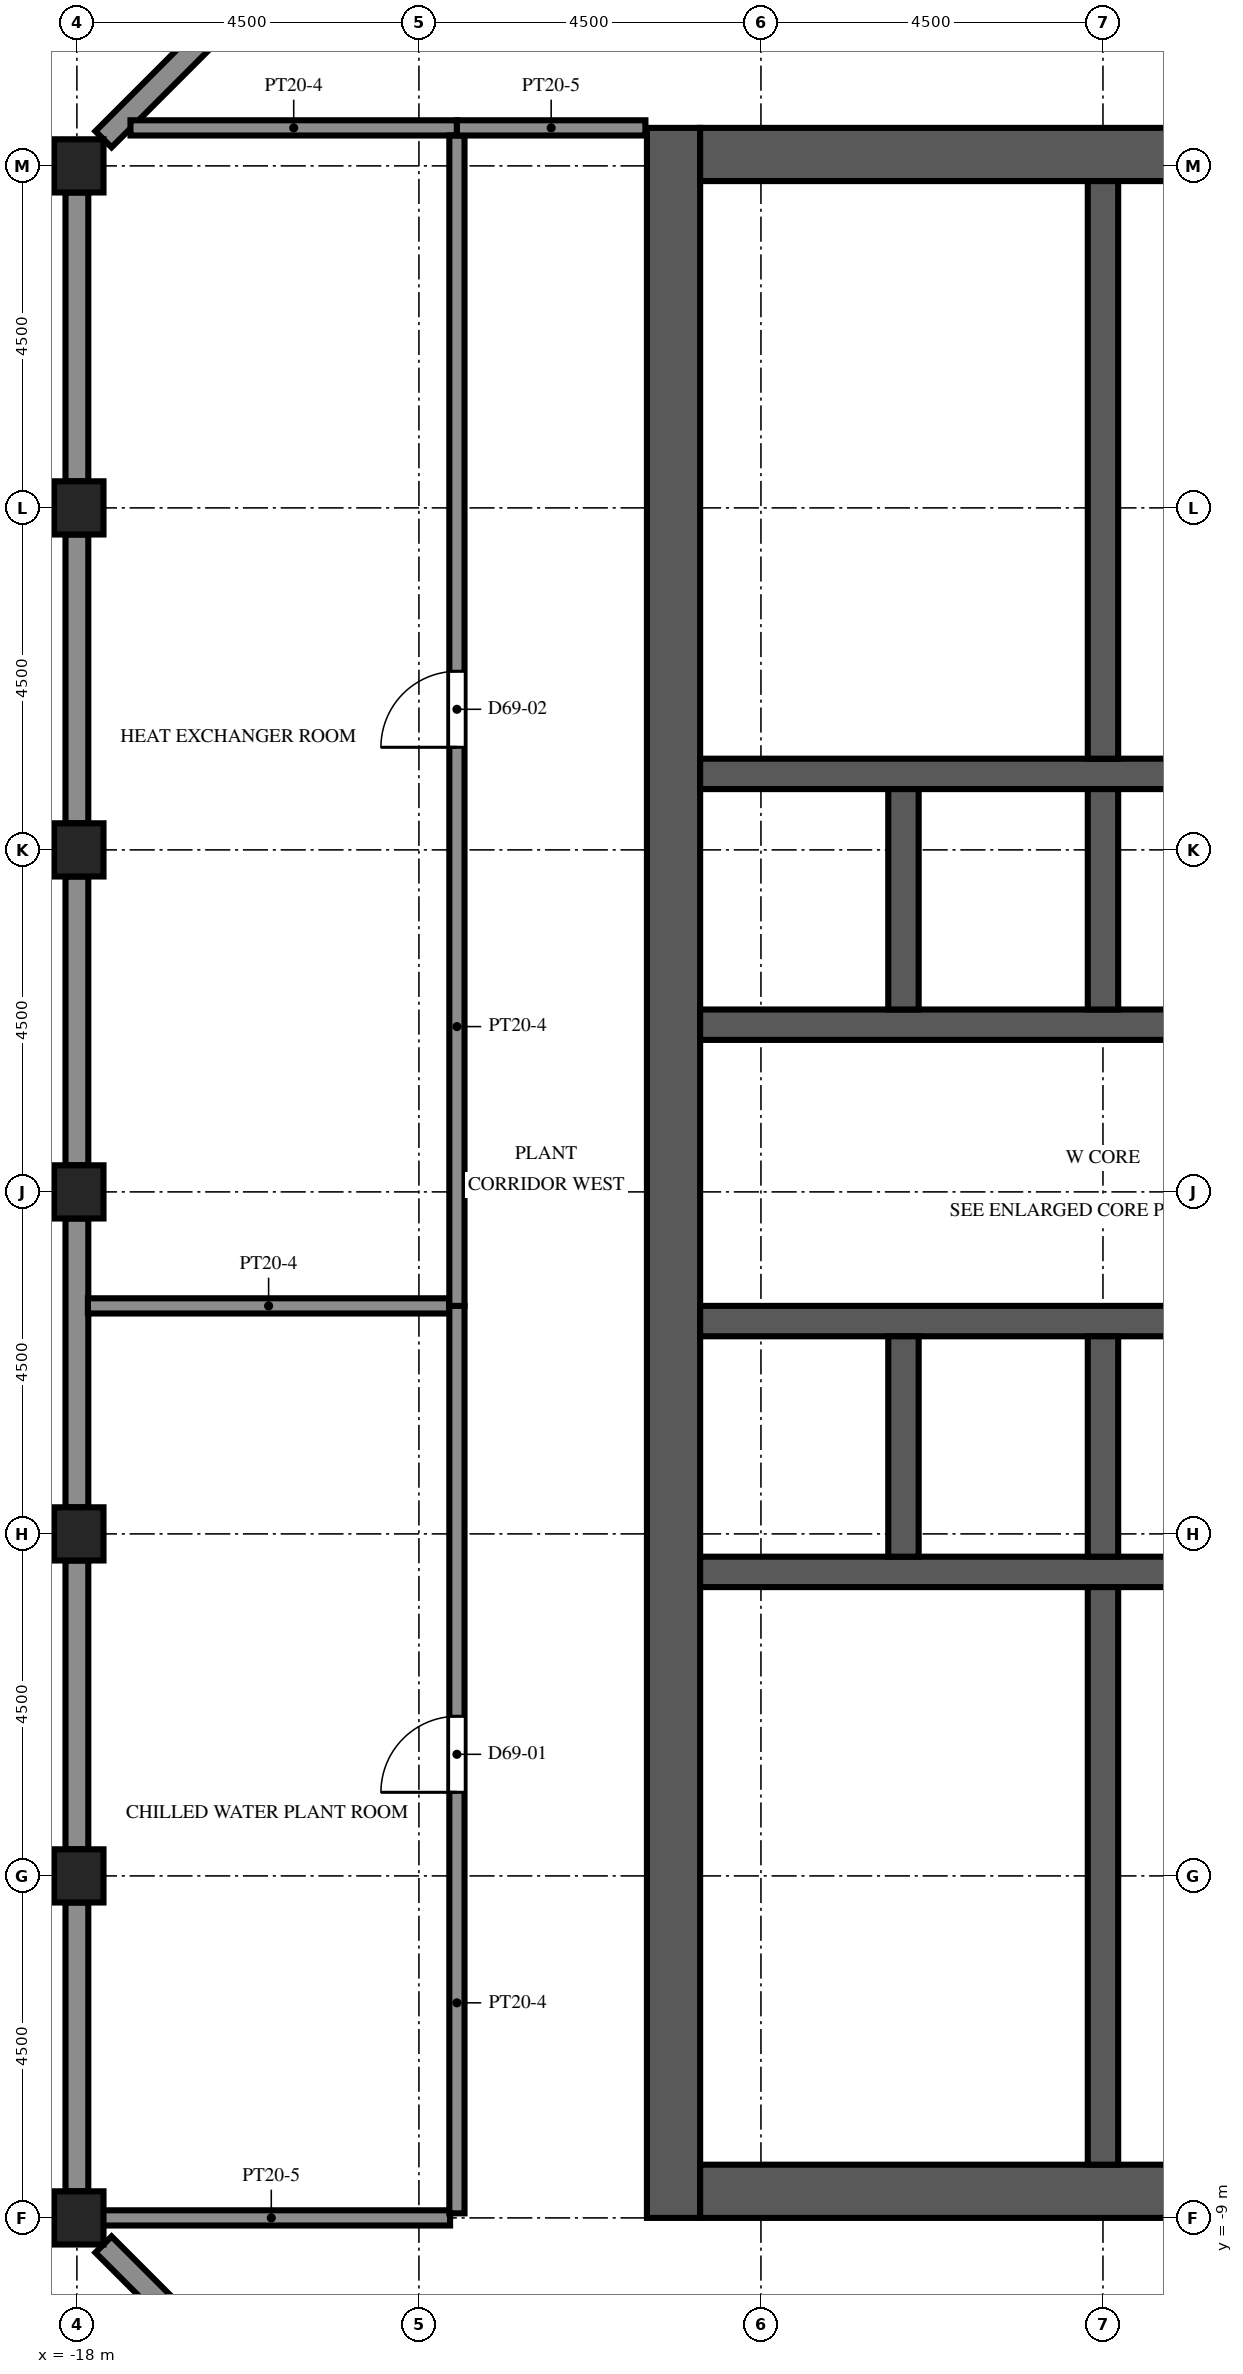
"""IFC4 building model, lengths in metres.
Left out: names, types, materials, properties, quantities, classifications, styles, units other than length and angle.
Written with IfcOpenShell. Run it as: python <this file> out.ifc"""

import sys

from ifc_helpers import new_model, si_unit, direction, frame, frame_2d, origin, origin_2d, place, context, subcontext, project, spatial, rectangle, extrude, element, fill, save


model = new_model("IFC4")
c1 = context("Model", 3, precision=1e-05, world=origin(), true_north=direction((0.0, 1.0)))
c2 = subcontext(c1, "Body", "Model", "MODEL_VIEW")
j1 = project(units=[si_unit("LENGTHUNIT", "METRE"), si_unit("PLANEANGLEUNIT", "RADIAN")], contexts=[c1])
p1 = place(None, origin())
s1 = spatial("IfcSite", under=j1, at=p1, CompositionType="ELEMENT")
p2 = place(p1, origin())
s2 = spatial("IfcBuilding", under=s1, at=p2, CompositionType="ELEMENT")
p3 = place(p2, frame((0.0, 0.0, 306.4)))
s3 = spatial("IfcBuildingStorey", under=s2, at=p3, CompositionType="ELEMENT", Elevation=306.4)
for number, where, z_axis, x_axis in (
    (1, (-18.0, -9.0, 0.0), (0.0, 0.0, 1.0), (1.0, 0.0, 0.0)),
    (2, (-18.0, -4.5, 0.0), (0.0, 0.0, 1.0), (1.0, 0.0, 0.0)),
    (3, (-18.0, 0.0, 0.0), (0.0, 0.0, 1.0), (1.0, 0.0, 0.0)),
    (4, (-18.0, 4.5, 0.0), (0.0, 0.0, 1.0), (1.0, 0.0, 0.0)),
    (5, (-18.0, 9.0, 0.0), (0.0, 0.0, 1.0), (1.0, 0.0, 0.0)),
    (6, (-18.0, 13.5, 0.0), (0.0, 0.0, 1.0), (1.0, 0.0, 0.0)),
    (7, (-18.0, 18.0, 0.0), (0.0, 0.0, 1.0), (1.0, 0.0, 0.0)),
):
    element("IfcColumn", number, at=place(p3, frame(where, z_axis=z_axis, x_axis=x_axis)), inside=s3, PredefinedType="COLUMN", context=c2, shape_type="SweptSolid", body=[
        extrude(rectangle(XDim=0.7, YDim=0.7, at=origin_2d()), origin(), (0.0, 0.0, 1.0), 5.4),
    ])
p4 = place(p3, frame((-10.15, -9.0, 0.0), z_axis=(0.0, 0.0, 1.0), x_axis=(0.0, 1.0, 0.0)))
e8 = element("IfcWall", 8, at=p4, inside=s3, PredefinedType="SHEAR", context=c2, shape_type="SweptSolid", body=[
    extrude(rectangle(XDim=27.5, YDim=0.7, at=frame_2d((13.75, 0.0))), origin(), (0.0, 0.0, 1.0), 5.4),
])
p5 = place(p4, frame((12.55, 0.0, 0.0)))
e9 = element("IfcOpeningElement", 9, at=p5, cuts=e8, PredefinedType="OPENING", context=c2, shape_type="SweptSolid", body=[
    extrude(rectangle(XDim=2.4, YDim=2.4, at=frame_2d((1.2, 1.2))), frame((0.0, 0.36, 0.0), z_axis=(0.0, -1.0, 0.0), x_axis=(1.0, 0.0, 0.0)), (0.0, 0.0, 1.0), 0.72),
])
p6 = place(p4, frame((6.825, 0.0, 0.0)))
e10 = element("IfcOpeningElement", 10, at=p6, cuts=e8, PredefinedType="OPENING", context=c2, shape_type="SweptSolid", body=[
    extrude(rectangle(XDim=1.2, YDim=2.1, at=frame_2d((0.6, 1.05))), frame((0.0, 0.36, 0.0), z_axis=(0.0, -1.0, 0.0), x_axis=(1.0, 0.0, 0.0)), (0.0, 0.0, 1.0), 0.72),
])
p7 = place(p4, frame((19.475, 0.0, 0.0)))
e11 = element("IfcOpeningElement", 11, at=p7, cuts=e8, PredefinedType="OPENING", context=c2, shape_type="SweptSolid", body=[
    extrude(rectangle(XDim=1.2, YDim=2.1, at=frame_2d((0.6, 1.05))), frame((0.0, 0.36, 0.0), z_axis=(0.0, -1.0, 0.0), x_axis=(1.0, 0.0, 0.0)), (0.0, 0.0, 1.0), 0.72),
])
for number, where, z_axis, x_axis in (
    (12, (-9.8, -8.65, 0.0), (0.0, 0.0, 1.0), (1.0, 0.0, 0.0)),
    (13, (-9.8, 18.15, 0.0), (0.0, 0.0, 1.0), (1.0, 0.0, 0.0)),
):
    element("IfcWall", number, at=place(p3, frame(where, z_axis=z_axis, x_axis=x_axis)), inside=s3, PredefinedType="SHEAR", context=c2, shape_type="SweptSolid", body=[
        extrude(rectangle(XDim=10.6, YDim=0.7, at=frame_2d((5.3, 0.0))), origin(), (0.0, 0.0, 1.0), 5.4),
    ])
p8 = place(p3, frame((-9.8, -0.5, 0.0), z_axis=(0.0, 0.0, 1.0), x_axis=(1.0, 0.0, 0.0)))
e14 = element("IfcWall", 14, at=p8, inside=s3, PredefinedType="SHEAR", context=c2, shape_type="SweptSolid", body=[
    extrude(rectangle(XDim=10.6, YDim=0.4, at=frame_2d((5.3, 0.0))), origin(), (0.0, 0.0, 1.0), 5.4),
])
p9 = place(p3, frame((-9.8, 2.8, 0.0), z_axis=(0.0, 0.0, 1.0), x_axis=(1.0, 0.0, 0.0)))
e15 = element("IfcWall", 15, at=p9, inside=s3, PredefinedType="SHEAR", context=c2, shape_type="SweptSolid", body=[
    extrude(rectangle(XDim=10.6, YDim=0.4, at=frame_2d((5.3, 0.0))), origin(), (0.0, 0.0, 1.0), 5.4),
])
p10 = place(p9, frame((0.688, 0.0, 0.0)))
e16 = element("IfcOpeningElement", 16, at=p10, cuts=e15, PredefinedType="OPENING", context=c2, shape_type="SweptSolid", body=[
    extrude(rectangle(XDim=1.1, YDim=2.1, at=frame_2d((0.55, 1.05))), frame((0.0, 0.21, 0.0), z_axis=(0.0, -1.0, 0.0), x_axis=(1.0, 0.0, 0.0)), (0.0, 0.0, 1.0), 0.42),
])
p11 = place(p9, frame((3.438, 0.0, 0.0)))
e17 = element("IfcOpeningElement", 17, at=p11, cuts=e15, PredefinedType="OPENING", context=c2, shape_type="SweptSolid", body=[
    extrude(rectangle(XDim=1.1, YDim=2.1, at=frame_2d((0.55, 1.05))), frame((0.0, 0.21, 0.0), z_axis=(0.0, -1.0, 0.0), x_axis=(1.0, 0.0, 0.0)), (0.0, 0.0, 1.0), 0.42),
])
p12 = place(p9, frame((6.113, 0.0, 0.0)))
e18 = element("IfcOpeningElement", 18, at=p12, cuts=e15, PredefinedType="OPENING", context=c2, shape_type="SweptSolid", body=[
    extrude(rectangle(XDim=1.0, YDim=2.1, at=frame_2d((0.5, 1.05))), frame((0.0, 0.21, 0.0), z_axis=(0.0, -1.0, 0.0), x_axis=(1.0, 0.0, 0.0)), (0.0, 0.0, 1.0), 0.42),
])
p13 = place(p9, frame((8.863, 0.0, 0.0)))
e19 = element("IfcOpeningElement", 19, at=p13, cuts=e15, PredefinedType="OPENING", context=c2, shape_type="SweptSolid", body=[
    extrude(rectangle(XDim=1.0, YDim=2.1, at=frame_2d((0.5, 1.05))), frame((0.0, 0.21, 0.0), z_axis=(0.0, -1.0, 0.0), x_axis=(1.0, 0.0, 0.0)), (0.0, 0.0, 1.0), 0.42),
])
p14 = place(p3, frame((-9.8, 6.7, 0.0), z_axis=(0.0, 0.0, 1.0), x_axis=(1.0, 0.0, 0.0)))
e20 = element("IfcWall", 20, at=p14, inside=s3, PredefinedType="SHEAR", context=c2, shape_type="SweptSolid", body=[
    extrude(rectangle(XDim=10.6, YDim=0.4, at=frame_2d((5.3, 0.0))), origin(), (0.0, 0.0, 1.0), 5.4),
])
p15 = place(p14, frame((0.738, 0.0, 0.0)))
e21 = element("IfcOpeningElement", 21, at=p15, cuts=e20, PredefinedType="OPENING", context=c2, shape_type="SweptSolid", body=[
    extrude(rectangle(XDim=1.0, YDim=2.1, at=frame_2d((0.5, 1.05))), frame((0.0, 0.21, 0.0), z_axis=(0.0, -1.0, 0.0), x_axis=(1.0, 0.0, 0.0)), (0.0, 0.0, 1.0), 0.42),
])
p16 = place(p14, frame((3.488, 0.0, 0.0)))
e22 = element("IfcOpeningElement", 22, at=p16, cuts=e20, PredefinedType="OPENING", context=c2, shape_type="SweptSolid", body=[
    extrude(rectangle(XDim=1.0, YDim=2.1, at=frame_2d((0.5, 1.05))), frame((0.0, 0.21, 0.0), z_axis=(0.0, -1.0, 0.0), x_axis=(1.0, 0.0, 0.0)), (0.0, 0.0, 1.0), 0.42),
])
p17 = place(p14, frame((6.113, 0.0, 0.0)))
e23 = element("IfcOpeningElement", 23, at=p17, cuts=e20, PredefinedType="OPENING", context=c2, shape_type="SweptSolid", body=[
    extrude(rectangle(XDim=1.0, YDim=2.1, at=frame_2d((0.5, 1.05))), frame((0.0, 0.21, 0.0), z_axis=(0.0, -1.0, 0.0), x_axis=(1.0, 0.0, 0.0)), (0.0, 0.0, 1.0), 0.42),
])
p18 = place(p14, frame((8.863, 0.0, 0.0)))
e24 = element("IfcOpeningElement", 24, at=p18, cuts=e20, PredefinedType="OPENING", context=c2, shape_type="SweptSolid", body=[
    extrude(rectangle(XDim=1.0, YDim=2.1, at=frame_2d((0.5, 1.05))), frame((0.0, 0.21, 0.0), z_axis=(0.0, -1.0, 0.0), x_axis=(1.0, 0.0, 0.0)), (0.0, 0.0, 1.0), 0.42),
])
p19 = place(p3, frame((-9.8, 10.0, 0.0), z_axis=(0.0, 0.0, 1.0), x_axis=(1.0, 0.0, 0.0)))
e25 = element("IfcWall", 25, at=p19, inside=s3, PredefinedType="SHEAR", context=c2, shape_type="SweptSolid", body=[
    extrude(rectangle(XDim=10.6, YDim=0.4, at=frame_2d((5.3, 0.0))), origin(), (0.0, 0.0, 1.0), 5.4),
])
for number, where, z_axis, x_axis in (
    (26, (-7.125, -0.3, 0.0), (0.0, 0.0, 1.0), (0.0, 1.0, 0.0)),
    (27, (-7.125, 6.9, 0.0), (0.0, 0.0, 1.0), (0.0, 1.0, 0.0)),
    (28, (-4.5, -0.3, 0.0), (0.0, 0.0, 1.0), (0.0, 1.0, 0.0)),
    (29, (-4.5, 6.9, 0.0), (0.0, 0.0, 1.0), (0.0, 1.0, 0.0)),
):
    element("IfcWall", number, at=place(p3, frame(where, z_axis=z_axis, x_axis=x_axis)), inside=s3, PredefinedType="SHEAR", context=c2, shape_type="SweptSolid", body=[
        extrude(rectangle(XDim=2.9, YDim=0.4, at=frame_2d((1.45, 0.0))), origin(), (0.0, 0.0, 1.0), 5.4),
    ])
for number, where, z_axis, x_axis in (
    (30, (-4.5, -8.3, 0.0), (0.0, 0.0, 1.0), (0.0, 1.0, 0.0)),
    (31, (-4.5, 10.2, 0.0), (0.0, 0.0, 1.0), (0.0, 1.0, 0.0)),
):
    element("IfcWall", number, at=place(p3, frame(where, z_axis=z_axis, x_axis=x_axis)), inside=s3, PredefinedType="SHEAR", context=c2, shape_type="SweptSolid", body=[
        extrude(rectangle(XDim=7.6, YDim=0.4, at=frame_2d((3.8, 0.0))), origin(), (0.0, 0.0, 1.0), 5.4),
    ])
p20 = place(p3, frame((-13.85, 22.15, 0.0), z_axis=(0.0, 0.0, 1.0), x_axis=(-0.707106781187, -0.707106781187, 0.0)))
e32 = element("IfcWall", 32, at=p20, inside=s3, PredefinedType="SOLIDWALL", context=c2, shape_type="SweptSolid", body=[
    extrude(rectangle(XDim=5.374, YDim=0.3, at=frame_2d((2.687, 0.0))), origin(), (0.0, 0.0, 1.0), 4.1),
])
for number, where, z_axis, x_axis in (
    (33, (-18.0, 17.65, 0.0), (0.0, 0.0, 1.0), (0.0, -1.0, 0.0)),
    (34, (-18.0, 13.15, 0.0), (0.0, 0.0, 1.0), (0.0, -1.0, 0.0)),
    (35, (-18.0, 8.65, 0.0), (0.0, 0.0, 1.0), (0.0, -1.0, 0.0)),
    (36, (-18.0, 4.15, 0.0), (0.0, 0.0, 1.0), (0.0, -1.0, 0.0)),
    (37, (-18.0, -0.35, 0.0), (0.0, 0.0, 1.0), (0.0, -1.0, 0.0)),
    (38, (-18.0, -4.85, 0.0), (0.0, 0.0, 1.0), (0.0, -1.0, 0.0)),
):
    element("IfcWall", number, at=place(p3, frame(where, z_axis=z_axis, x_axis=x_axis)), inside=s3, PredefinedType="SOLIDWALL", context=c2, shape_type="SweptSolid", body=[
        extrude(rectangle(XDim=3.8, YDim=0.3, at=frame_2d((1.9, 0.0))), origin(), (0.0, 0.0, 1.0), 0.85),
    ])
p21 = place(p3, frame((-17.65, -9.35, 0.0), z_axis=(0.0, 0.0, 1.0), x_axis=(0.707106781187, -0.707106781187, 0.0)))
e39 = element("IfcWall", 39, at=p21, inside=s3, PredefinedType="SOLIDWALL", context=c2, shape_type="SweptSolid", body=[
    extrude(rectangle(XDim=5.374, YDim=0.3, at=frame_2d((2.687, 0.0))), origin(), (0.0, 0.0, 1.0), 4.1),
])
p22 = place(p3, frame((-17.855, 3.0, 0.0), z_axis=(0.0, 0.0, 1.0), x_axis=(1.0, 0.0, 0.0)))
e40 = element("IfcWall", 40, at=p22, inside=s3, PredefinedType="PARTITIONING", context=c2, shape_type="SweptSolid", body=[
    extrude(rectangle(XDim=4.755, YDim=0.2, at=frame_2d((2.377, 0.0))), origin(), (0.0, 0.0, 1.0), 3.6),
])
p23 = place(p3, frame((-17.795, -9.0, 0.0), z_axis=(0.0, 0.0, 1.0), x_axis=(1.0, 0.0, 0.0)))
e41 = element("IfcWall", 41, at=p23, inside=s3, PredefinedType="PARTITIONING", context=c2, shape_type="SweptSolid", body=[
    extrude(rectangle(XDim=4.705, YDim=0.2, at=frame_2d((2.353, 0.0))), origin(), (0.0, 0.0, 1.0), 4.8),
])
p24 = place(p3, frame((-17.295, 18.5, 0.0), z_axis=(0.0, 0.0, 1.0), x_axis=(1.0, 0.0, 0.0)))
e42 = element("IfcWall", 42, at=p24, inside=s3, PredefinedType="PARTITIONING", context=c2, shape_type="SweptSolid", body=[
    extrude(rectangle(XDim=4.295, YDim=0.2, at=frame_2d((2.147, 0.0))), origin(), (0.0, 0.0, 1.0), 3.6),
])
p25 = place(p3, frame((-13.0, -8.94, 0.0), z_axis=(0.0, 0.0, 1.0), x_axis=(0.0, 1.0, 0.0)))
e43 = element("IfcWall", 43, at=p25, inside=s3, PredefinedType="PARTITIONING", context=c2, shape_type="SweptSolid", body=[
    extrude(rectangle(XDim=11.94, YDim=0.2, at=frame_2d((5.97, 0.0))), origin(), (0.0, 0.0, 1.0), 3.6),
])
p26 = place(p25, frame((5.54, 0.0, 0.0)))
e44 = element("IfcOpeningElement", 44, at=p26, cuts=e43, PredefinedType="OPENING", context=c2, shape_type="SweptSolid", body=[
    extrude(rectangle(XDim=1.0, YDim=2.1, at=frame_2d((0.5, 1.05))), frame((0.0, 0.11, 0.0), z_axis=(0.0, -1.0, 0.0), x_axis=(1.0, 0.0, 0.0)), (0.0, 0.0, 1.0), 0.22),
])
p27 = place(p3, frame((-13.0, 3.0, 0.0), z_axis=(0.0, 0.0, 1.0), x_axis=(0.0, 1.0, 0.0)))
e45 = element("IfcWall", 45, at=p27, inside=s3, PredefinedType="PARTITIONING", context=c2, shape_type="SweptSolid", body=[
    extrude(rectangle(XDim=15.4, YDim=0.2, at=frame_2d((7.7, 0.0))), origin(), (0.0, 0.0, 1.0), 3.6),
])
p28 = place(p27, frame((7.35, 0.0, 0.0)))
e46 = element("IfcOpeningElement", 46, at=p28, cuts=e45, PredefinedType="OPENING", context=c2, shape_type="SweptSolid", body=[
    extrude(rectangle(XDim=1.0, YDim=2.1, at=frame_2d((0.5, 1.05))), frame((0.0, 0.11, 0.0), z_axis=(0.0, -1.0, 0.0), x_axis=(1.0, 0.0, 0.0)), (0.0, 0.0, 1.0), 0.22),
])
p29 = place(p3, frame((-13.0, 18.5, 0.0), z_axis=(0.0, 0.0, 1.0), x_axis=(1.0, 0.0, 0.0)))
e47 = element("IfcWall", 47, at=p29, inside=s3, PredefinedType="PARTITIONING", context=c2, shape_type="SweptSolid", body=[
    extrude(rectangle(XDim=2.48, YDim=0.2, at=frame_2d((1.24, 0.0))), origin(), (0.0, 0.0, 1.0), 4.8),
])
p30 = place(p3, frame((-4.3, -3.74, 0.0), z_axis=(0.0, 0.0, 1.0), x_axis=(1.0, 0.0, 0.0)))
e48 = element("IfcWall", 48, at=p30, inside=s3, PredefinedType="PARTITIONING", context=c2, shape_type="SweptSolid", body=[
    extrude(rectangle(XDim=2.55, YDim=0.1, at=frame_2d((1.275, 0.0))), origin(), (0.0, 0.0, 1.0), 4.8),
])
p31 = place(p30, frame((0.775, 0.0, 0.0)))
e49 = element("IfcOpeningElement", 49, at=p31, cuts=e48, PredefinedType="OPENING", context=c2, shape_type="SweptSolid", body=[
    extrude(rectangle(XDim=1.0, YDim=2.1, at=frame_2d((0.5, 1.05))), frame((0.0, 0.06, 0.0), z_axis=(0.0, -1.0, 0.0), x_axis=(1.0, 0.0, 0.0)), (0.0, 0.0, 1.0), 0.12),
])
p32 = place(p3, frame((-4.3, -2.372, 0.0), z_axis=(0.0, 0.0, 1.0), x_axis=(1.0, 0.0, 0.0)))
e50 = element("IfcWall", 50, at=p32, inside=s3, PredefinedType="PARTITIONING", context=c2, shape_type="SweptSolid", body=[
    extrude(rectangle(XDim=2.55, YDim=0.1, at=frame_2d((1.275, 0.0))), origin(), (0.0, 0.0, 1.0), 4.8),
])
p33 = place(p32, frame((0.775, 0.0, 0.0)))
e51 = element("IfcOpeningElement", 51, at=p33, cuts=e50, PredefinedType="OPENING", context=c2, shape_type="SweptSolid", body=[
    extrude(rectangle(XDim=1.0, YDim=2.1, at=frame_2d((0.5, 1.05))), frame((0.0, 0.06, 0.0), z_axis=(0.0, -1.0, 0.0), x_axis=(1.0, 0.0, 0.0)), (0.0, 0.0, 1.0), 0.12),
])
for number, where, z_axis, x_axis in (
    (52, (-4.3, 12.48, 0.0), (0.0, 0.0, 1.0), (1.0, 0.0, 0.0)),
    (53, (-4.3, 15.14, 0.0), (0.0, 0.0, 1.0), (1.0, 0.0, 0.0)),
):
    element("IfcWall", number, at=place(p3, frame(where, z_axis=z_axis, x_axis=x_axis)), inside=s3, PredefinedType="PARTITIONING", context=c2, shape_type="SweptSolid", body=[
        extrude(rectangle(XDim=3.8, YDim=0.1, at=frame_2d((1.9, 0.0))), origin(), (0.0, 0.0, 1.0), 4.8),
    ])
p34 = place(p26, origin())
e54 = element("IfcDoor", 54, at=p34, inside=s3, OperationType="SINGLE_SWING_LEFT", PredefinedType="DOOR", context=c2, shape_type="SweptSolid", body=[
    extrude(rectangle(XDim=1.0, YDim=2.1, at=frame_2d((0.5, 1.05))), frame((0.0, 0.025, 0.0), z_axis=(0.0, -1.0, 0.0), x_axis=(1.0, 0.0, 0.0)), (0.0, 0.0, 1.0), 0.05),
])
fill(e44, e54)
p35 = place(p28, origin())
e55 = element("IfcDoor", 55, at=p35, inside=s3, OperationType="SINGLE_SWING_LEFT", PredefinedType="DOOR", context=c2, shape_type="SweptSolid", body=[
    extrude(rectangle(XDim=1.0, YDim=2.1, at=frame_2d((0.5, 1.05))), frame((0.0, 0.025, 0.0), z_axis=(0.0, -1.0, 0.0), x_axis=(1.0, 0.0, 0.0)), (0.0, 0.0, 1.0), 0.05),
])
fill(e46, e55)
p36 = place(p10, origin())
e56 = element("IfcDoor", 56, at=p36, inside=s3, OperationType="DOUBLE_DOOR_SLIDING", PredefinedType="DOOR", context=c2, shape_type="SweptSolid", body=[
    extrude(rectangle(XDim=1.1, YDim=2.1, at=frame_2d((0.55, 1.05))), frame((0.0, 0.025, 0.0), z_axis=(0.0, -1.0, 0.0), x_axis=(1.0, 0.0, 0.0)), (0.0, 0.0, 1.0), 0.05),
])
fill(e16, e56)
p37 = place(p11, origin())
e57 = element("IfcDoor", 57, at=p37, inside=s3, OperationType="DOUBLE_DOOR_SLIDING", PredefinedType="DOOR", context=c2, shape_type="SweptSolid", body=[
    extrude(rectangle(XDim=1.1, YDim=2.1, at=frame_2d((0.55, 1.05))), frame((0.0, 0.025, 0.0), z_axis=(0.0, -1.0, 0.0), x_axis=(1.0, 0.0, 0.0)), (0.0, 0.0, 1.0), 0.05),
])
fill(e17, e57)
p38 = place(p5, origin())
e58 = element("IfcDoor", 58, at=p38, inside=s3, OperationType="DOUBLE_DOOR_DOUBLE_SWING", PredefinedType="DOOR", context=c2, shape_type="SweptSolid", body=[
    extrude(rectangle(XDim=2.4, YDim=2.4, at=frame_2d((1.2, 1.2))), frame((0.0, 0.025, 0.0), z_axis=(0.0, -1.0, 0.0), x_axis=(1.0, 0.0, 0.0)), (0.0, 0.0, 1.0), 0.05),
])
fill(e9, e58)
p39 = place(p6, origin())
e59 = element("IfcDoor", 59, at=p39, inside=s3, OperationType="SINGLE_SWING_LEFT", PredefinedType="DOOR", context=c2, shape_type="SweptSolid", body=[
    extrude(rectangle(XDim=1.2, YDim=2.1, at=frame_2d((0.6, 1.05))), frame((0.0, 0.025, 0.0), z_axis=(0.0, -1.0, 0.0), x_axis=(1.0, 0.0, 0.0)), (0.0, 0.0, 1.0), 0.05),
])
fill(e10, e59)
p40 = place(p7, origin())
e60 = element("IfcDoor", 60, at=p40, inside=s3, OperationType="SINGLE_SWING_LEFT", PredefinedType="DOOR", context=c2, shape_type="SweptSolid", body=[
    extrude(rectangle(XDim=1.2, YDim=2.1, at=frame_2d((0.6, 1.05))), frame((0.0, 0.025, 0.0), z_axis=(0.0, -1.0, 0.0), x_axis=(1.0, 0.0, 0.0)), (0.0, 0.0, 1.0), 0.05),
])
fill(e11, e60)
p41 = place(p15, origin())
e61 = element("IfcDoor", 61, at=p41, inside=s3, OperationType="SINGLE_SWING_LEFT", PredefinedType="DOOR", context=c2, shape_type="SweptSolid", body=[
    extrude(rectangle(XDim=1.0, YDim=2.1, at=frame_2d((0.5, 1.05))), frame((0.0, 0.025, 0.0), z_axis=(0.0, -1.0, 0.0), x_axis=(1.0, 0.0, 0.0)), (0.0, 0.0, 1.0), 0.05),
])
fill(e21, e61)
p42 = place(p16, origin())
e62 = element("IfcDoor", 62, at=p42, inside=s3, OperationType="SINGLE_SWING_RIGHT", PredefinedType="DOOR", context=c2, shape_type="SweptSolid", body=[
    extrude(rectangle(XDim=1.0, YDim=2.1, at=frame_2d((0.5, 1.05))), frame((0.0, 0.025, 0.0), z_axis=(0.0, -1.0, 0.0), x_axis=(1.0, 0.0, 0.0)), (0.0, 0.0, 1.0), 0.05),
])
fill(e22, e62)
save(model, sys.argv[1])
